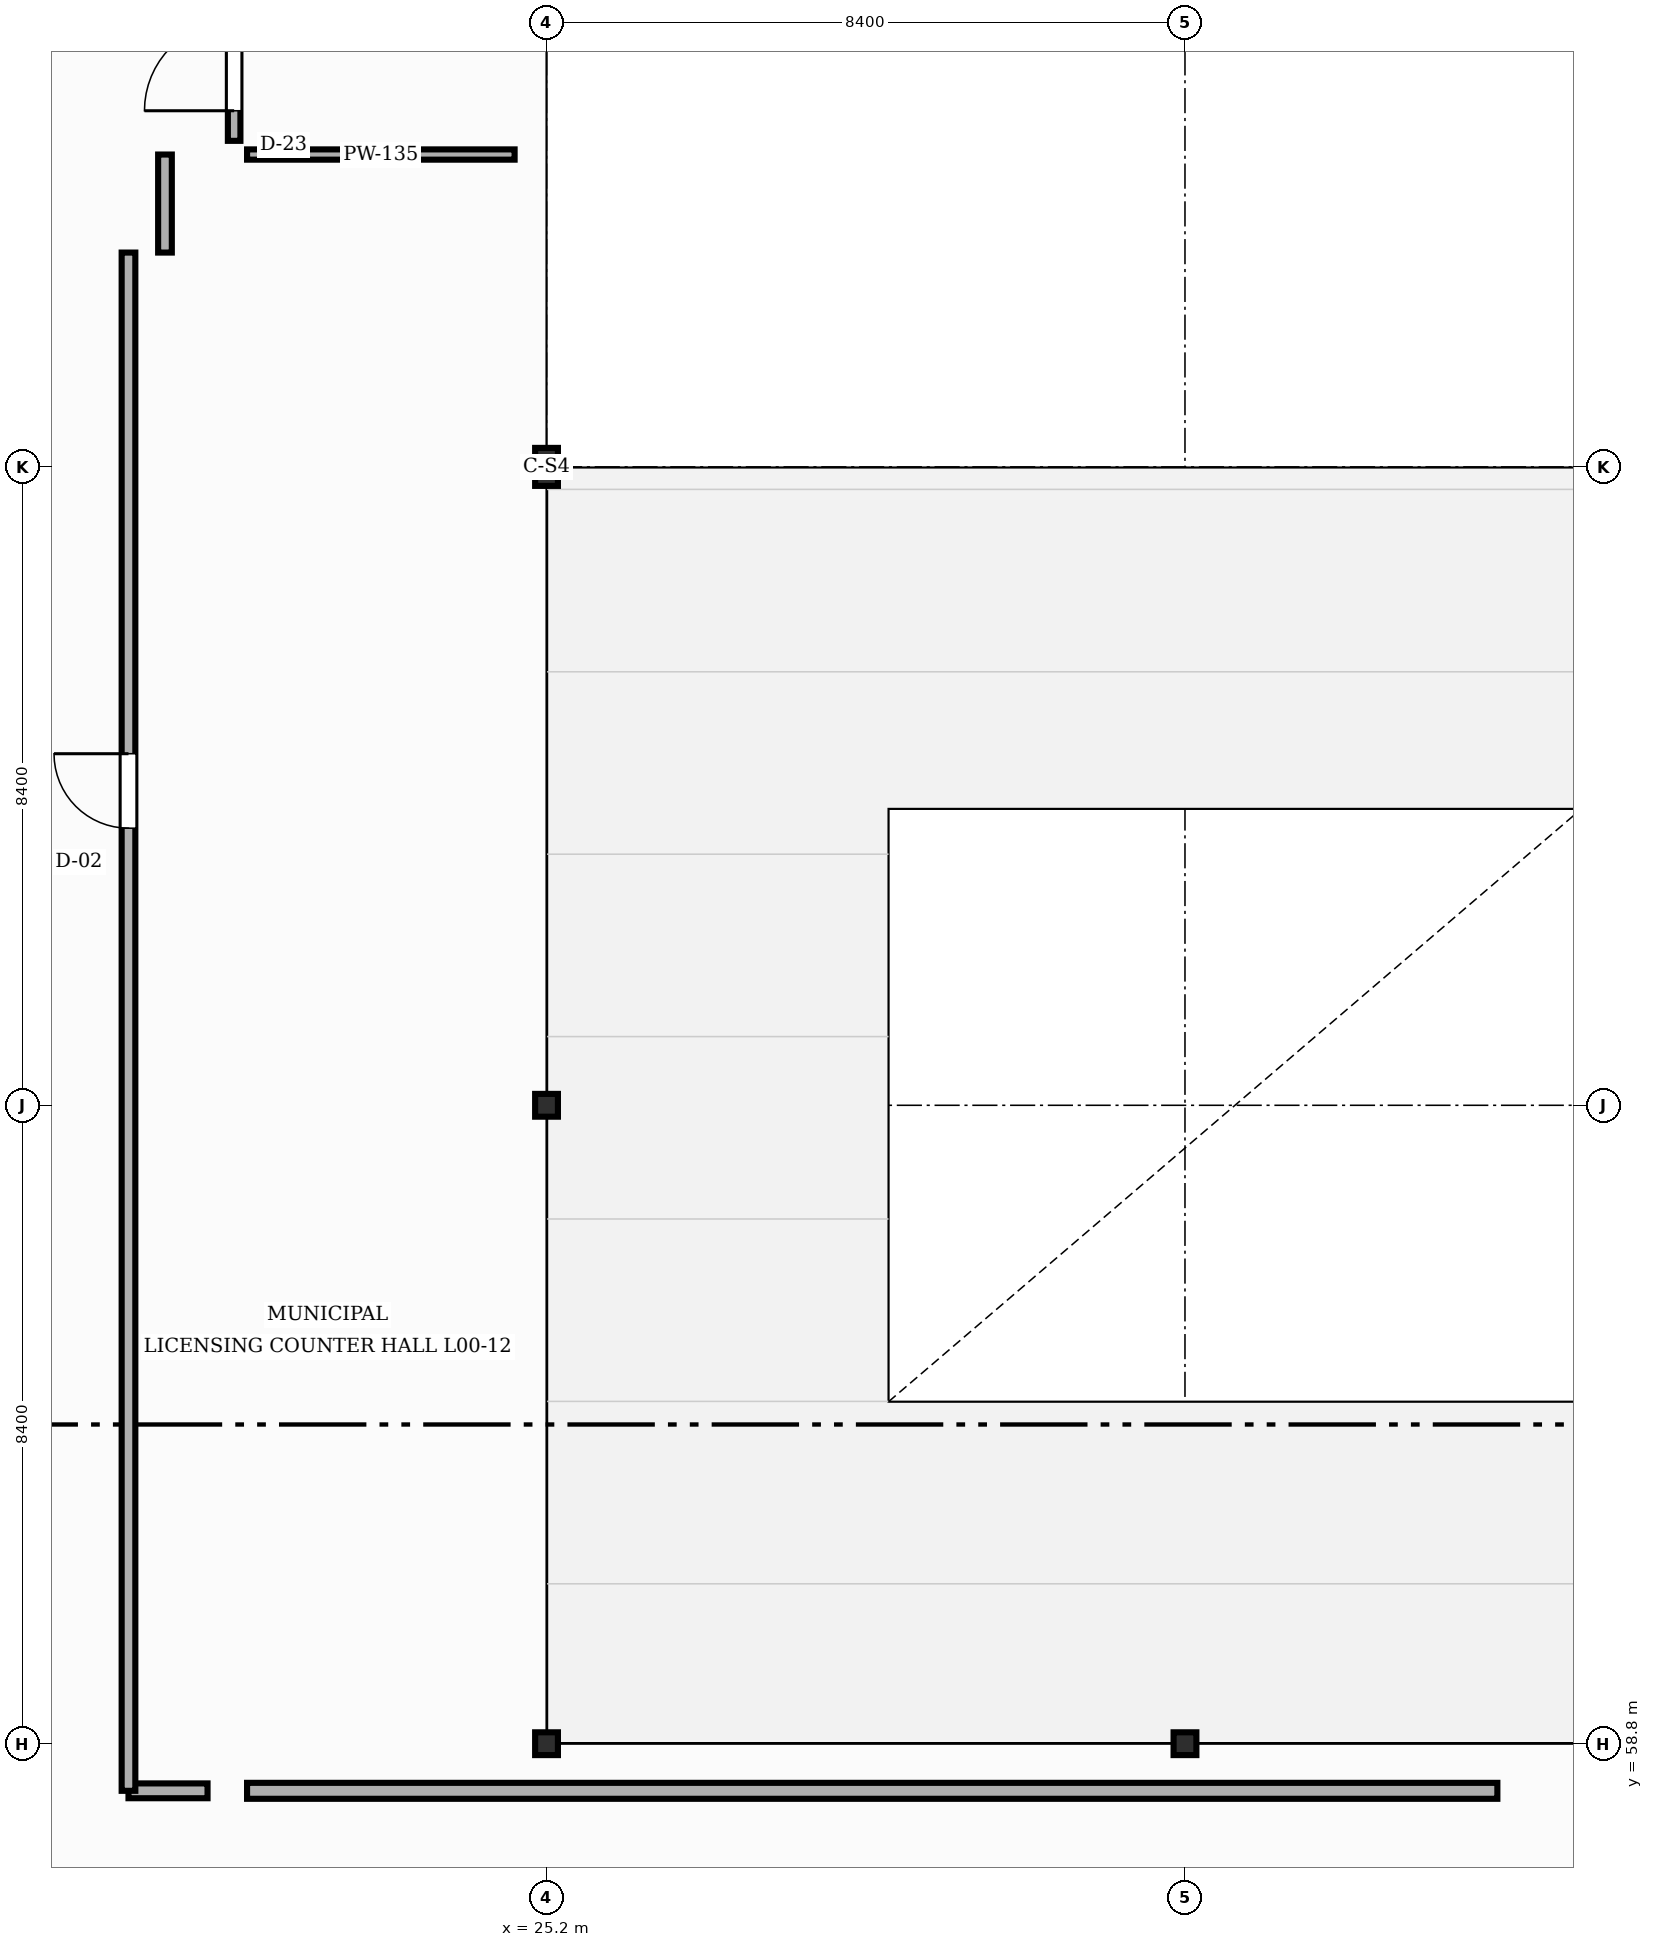
"""IFC4 building model, lengths in metres.
Left out: names, types, materials, properties, quantities, classifications, styles, units other than length and angle.
Written with IfcOpenShell. Run it as: python <this file> out.ifc"""

import sys

from ifc_helpers import new_model, si_unit, direction, frame, frame_2d, origin, origin_2d, place, context, subcontext, project, spatial, rectangle, i_section, extrude, element, fill, save


model = new_model("IFC4")
c1 = context("Model", 3, precision=1e-05, world=origin(), true_north=direction((0.0, 1.0)))
c2 = subcontext(c1, "Body", "Model", "MODEL_VIEW")
j1 = project(units=[si_unit("LENGTHUNIT", "METRE"), si_unit("PLANEANGLEUNIT", "RADIAN")], contexts=[c1])
p1 = place(None, origin())
s1 = spatial("IfcSite", under=j1, at=p1, CompositionType="ELEMENT")
p2 = place(p1, origin())
s2 = spatial("IfcBuilding", under=s1, at=p2, CompositionType="ELEMENT")
p3 = place(p2, origin())
s3 = spatial("IfcBuildingStorey", under=s2, at=p3, CompositionType="ELEMENT", Elevation=0.0)
for number, where, z_axis, x_axis in (
    (1, (25.2, 58.8, 0.0), (0.0, 0.0, 1.0), (1.0, 0.0, 0.0)),
    (2, (25.2, 67.2, 0.0), (0.0, 0.0, 1.0), (1.0, 0.0, 0.0)),
):
    element("IfcColumn", number, at=place(p3, frame(where, z_axis=z_axis, x_axis=x_axis)), inside=s3, PredefinedType="COLUMN", context=c2, shape_type="SweptSolid", body=[
        extrude(i_section(OverallWidth=0.3, OverallDepth=0.3, WebThickness=0.011, FlangeThickness=0.019, FilletRadius=0.027, at=origin_2d()), origin(), (0.0, 0.0, 1.0), 5.4),
    ])
p4 = place(p3, frame((25.2, 75.6, 0.0), z_axis=(0.0, 0.0, 1.0), x_axis=(1.0, 0.0, 0.0)))
e3 = element("IfcColumn", 3, at=p4, inside=s3, PredefinedType="COLUMN", context=c2, shape_type="SweptSolid", body=[
    extrude(i_section(OverallWidth=0.3, OverallDepth=0.5, WebThickness=0.014, FlangeThickness=0.028, FilletRadius=0.027, at=origin_2d()), origin(), (0.0, 0.0, 1.0), 5.4),
])
p5 = place(p3, frame((33.6, 58.8, 0.0), z_axis=(0.0, 0.0, 1.0), x_axis=(1.0, 0.0, 0.0)))
e4 = element("IfcColumn", 4, at=p5, inside=s3, PredefinedType="COLUMN", context=c2, shape_type="SweptSolid", body=[
    extrude(i_section(OverallWidth=0.3, OverallDepth=0.3, WebThickness=0.011, FlangeThickness=0.019, FilletRadius=0.027, at=origin_2d()), origin(), (0.0, 0.0, 1.0), 5.4),
])
p6 = place(p3, frame((20.18, 78.42, -0.004), z_axis=(0.0, 0.0, 1.0), x_axis=(0.0, 1.0, 0.0)))
e5 = element("IfcWall", 5, at=p6, inside=s3, PredefinedType="STANDARD", context=c2, shape_type="SweptSolid", body=[
    extrude(rectangle(XDim=1.29, YDim=0.18, at=frame_2d((0.645, 0.0))), origin(), (0.0, 0.0, 1.0), 5.179),
])
p7 = place(p3, frame((21.26, 79.71, -0.004), z_axis=(0.0, 0.0, 1.0), x_axis=(1.0, 0.0, 0.0)))
e6 = element("IfcWall", 6, at=p7, inside=s3, PredefinedType="STANDARD", context=c2, shape_type="SweptSolid", body=[
    extrude(rectangle(XDim=3.52, YDim=0.135, at=frame_2d((1.76, 0.0))), origin(), (0.0, 0.0, 1.0), 5.179),
])
p8 = place(p3, frame((37.71, 58.18, -0.004), z_axis=(0.0, 0.0, 1.0), x_axis=(-1.0, 0.0, 0.0)))
e7 = element("IfcWall", 7, at=p8, inside=s3, PredefinedType="STANDARD", context=c2, shape_type="SweptSolid", body=[
    extrude(rectangle(XDim=16.45, YDim=0.21, at=frame_2d((8.225, 0.0))), origin(), (0.0, 0.0, 1.0), 5.179),
])
p9 = place(p3, frame((20.74, 58.18, -0.004), z_axis=(0.0, 0.0, 1.0), x_axis=(-1.0, 0.0, 0.0)))
e8 = element("IfcWall", 8, at=p9, inside=s3, PredefinedType="STANDARD", context=c2, shape_type="SweptSolid", body=[
    extrude(rectangle(XDim=1.04, YDim=0.195, at=frame_2d((0.52, 0.0))), origin(), (0.0, 0.0, 1.0), 5.179),
])
p10 = place(p3, frame((19.7, 58.18, -0.004), z_axis=(0.0, 0.0, 1.0), x_axis=(0.0, 1.0, 0.0)))
e9 = element("IfcWall", 9, at=p10, inside=s3, PredefinedType="STANDARD", context=c2, shape_type="SweptSolid", body=[
    extrude(rectangle(XDim=20.24, YDim=0.18, at=frame_2d((10.12, 0.0))), origin(), (0.0, 0.0, 1.0), 4.891),
])
p11 = place(p10, frame((12.666, 0.0, 0.0)))
e10 = element("IfcOpeningElement", 10, at=p11, cuts=e9, PredefinedType="OPENING", context=c2, shape_type="SweptSolid", body=[
    extrude(rectangle(XDim=0.98, YDim=2.06, at=frame_2d((0.49, 1.03))), frame((0.0, 0.1, 0.0), z_axis=(0.0, -1.0, 0.0), x_axis=(1.0, 0.0, 0.0)), (0.0, 0.0, 1.0), 0.2),
])
p12 = place(p3, frame((21.09, 79.89, -0.004), z_axis=(0.0, 0.0, 1.0), x_axis=(0.0, 1.0, 0.0)))
e11 = element("IfcWall", 11, at=p12, inside=s3, PredefinedType="STANDARD", context=c2, shape_type="SweptSolid", body=[
    extrude(rectangle(XDim=4.93, YDim=0.165, at=frame_2d((2.465, 0.0))), origin(), (0.0, 0.0, 1.0), 5.179),
])
p13 = place(p12, frame((0.396, 0.0, 0.0)))
e12 = element("IfcOpeningElement", 12, at=p13, cuts=e11, PredefinedType="OPENING", context=c2, shape_type="SweptSolid", body=[
    extrude(rectangle(XDim=1.18, YDim=2.22, at=frame_2d((0.59, 1.11))), frame((0.0, 0.093, 0.0), z_axis=(0.0, -1.0, 0.0), x_axis=(1.0, 0.0, 0.0)), (0.0, 0.0, 1.0), 0.185),
])
p14 = place(p11, origin())
e13 = element("IfcDoor", 13, at=p14, inside=s3, OperationType="SINGLE_SWING_RIGHT", PredefinedType="DOOR", context=c2, shape_type="SweptSolid", body=[
    extrude(rectangle(XDim=0.98, YDim=2.06, at=frame_2d((0.49, 1.03))), frame((0.0, 0.025, 0.0), z_axis=(0.0, -1.0, 0.0), x_axis=(1.0, 0.0, 0.0)), (0.0, 0.0, 1.0), 0.05),
])
fill(e10, e13)
p15 = place(p13, origin())
e14 = element("IfcDoor", 14, at=p15, inside=s3, OperationType="SINGLE_SWING_LEFT", PredefinedType="DOOR", context=c2, shape_type="SweptSolid", body=[
    extrude(rectangle(XDim=1.18, YDim=2.22, at=frame_2d((0.59, 1.11))), frame((0.0, 0.025, 0.0), z_axis=(0.0, -1.0, 0.0), x_axis=(1.0, 0.0, 0.0)), (0.0, 0.0, 1.0), 0.05),
])
fill(e12, e14)
save(model, sys.argv[1])
